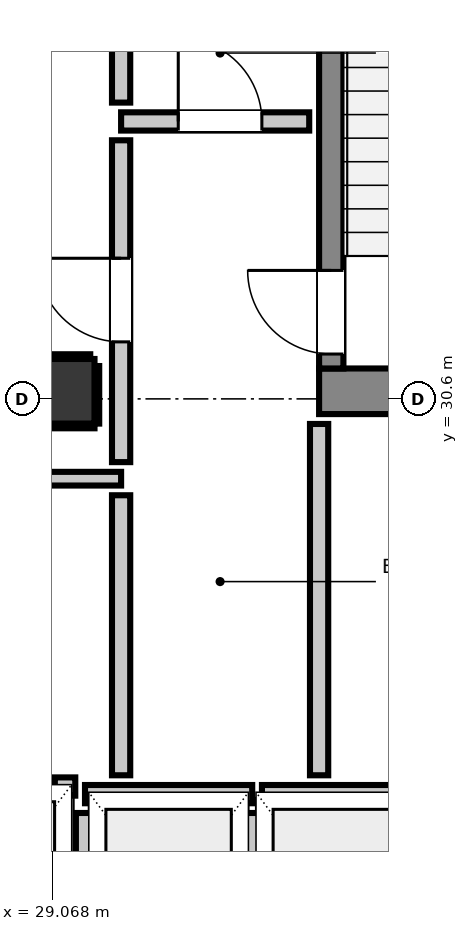
"""IFC4 building model, lengths in metres.
Left out: names, types, materials, properties, quantities, classifications, styles, units other than length and angle.
Written with IfcOpenShell. Run it as: python <this file> out.ifc"""

import sys

from ifc_helpers import new_model, si_unit, direction, frame, frame_2d, origin, origin_2d, place, context, subcontext, project, spatial, rectangle, extrude, element, fill, save


model = new_model("IFC4")
c1 = context("Model", 3, precision=1e-05, world=origin(), true_north=direction((0.0, 1.0)))
c2 = subcontext(c1, "Body", "Model", "MODEL_VIEW")
j1 = project(units=[si_unit("LENGTHUNIT", "METRE"), si_unit("PLANEANGLEUNIT", "RADIAN")], contexts=[c1])
p1 = place(None, origin())
s1 = spatial("IfcSite", under=j1, at=p1, CompositionType="ELEMENT")
p2 = place(p1, origin())
s2 = spatial("IfcBuilding", under=s1, at=p2, CompositionType="ELEMENT")
p3 = place(p2, frame((0.0, 0.0, 234.6)))
s3 = spatial("IfcBuildingStorey", under=s2, at=p3, CompositionType="ELEMENT", Elevation=234.6)
p4 = place(p3, frame((32.58, 30.7, 0.0), z_axis=(0.0, 0.0, 1.0), x_axis=(1.0, 0.0, 0.0)))
e1 = element("IfcWall", 1, at=p4, inside=s3, PredefinedType="SHEAR", context=c2, shape_type="SweptSolid", body=[
    extrude(rectangle(XDim=3.54, YDim=0.6, at=frame_2d((1.77, 0.0))), origin(), (0.0, 0.0, 1.0), 3.32),
])
p5 = place(p3, frame((32.74, 31.0, 0.0), z_axis=(0.0, 0.0, 1.0), x_axis=(0.0, 1.0, 0.0)))
e2 = element("IfcWall", 2, at=p5, inside=s3, PredefinedType="SHEAR", context=c2, shape_type="SweptSolid", body=[
    extrude(rectangle(XDim=7.8, YDim=0.32, at=frame_2d((3.9, 0.0))), origin(), (0.0, 0.0, 1.0), 3.32),
])
p6 = place(p5, frame((0.19, 0.0, 0.0)))
e3 = element("IfcOpeningElement", 3, at=p6, cuts=e2, PredefinedType="OPENING", context=c2, shape_type="SweptSolid", body=[
    extrude(rectangle(XDim=1.1, YDim=2.15, at=frame_2d((0.55, 1.075))), frame((0.0, 0.17, 0.0), z_axis=(0.0, -1.0, 0.0), x_axis=(1.0, 0.0, 0.0)), (0.0, 0.0, 1.0), 0.34),
])
p7 = place(p3, frame((29.2, 30.7, 0.0), z_axis=(0.0, 0.0, 1.0), x_axis=(1.0, 0.0, 0.0)))
e4 = element("IfcColumn", 4, at=p7, inside=s3, PredefinedType="COLUMN", context=c2, shape_type="SweptSolid", body=[
    extrude(rectangle(XDim=0.85, YDim=0.85, at=origin_2d()), origin(), (0.0, 0.0, 1.0), 3.32),
])
p8 = place(p3, frame((29.5, 25.4, 0.0), z_axis=(0.0, 0.0, 1.0), x_axis=(1.0, 0.0, 0.0)))
e5 = element("IfcWall", 5, at=p8, inside=s3, PredefinedType="PARTITIONING", context=c2, shape_type="SweptSolid", body=[
    extrude(rectangle(XDim=2.2, YDim=0.24, at=frame_2d((1.1, 0.0))), origin(), (0.0, 0.0, 1.0), 3.1),
])
p9 = place(p3, frame((29.5, 22.848, 0.0), z_axis=(0.0, 0.0, 1.0), x_axis=(0.0, 1.0, 0.0)))
e6 = element("IfcWall", 6, at=p9, inside=s3, PredefinedType="PARTITIONING", context=c2, shape_type="SweptSolid", body=[
    extrude(rectangle(XDim=2.304, YDim=0.24, at=frame_2d((1.152, 0.0))), origin(), (0.0, 0.0, 1.0), 2.335),
])
p10 = place(p3, frame((31.7, 22.848, 0.0), z_axis=(0.0, 0.0, 1.0), x_axis=(0.0, 1.0, 0.0)))
e7 = element("IfcWall", 7, at=p10, inside=s3, PredefinedType="PARTITIONING", context=c2, shape_type="SweptSolid", body=[
    extrude(rectangle(XDim=2.304, YDim=0.24, at=frame_2d((1.152, 0.0))), origin(), (0.0, 0.0, 1.0), 3.1),
])
p11 = place(p3, frame((31.828, 25.4, 0.0), z_axis=(0.0, 0.0, 1.0), x_axis=(1.0, 0.0, 0.0)))
e8 = element("IfcWall", 8, at=p11, inside=s3, PredefinedType="PARTITIONING", context=c2, shape_type="SweptSolid", body=[
    extrude(rectangle(XDim=2.072, YDim=0.24, at=frame_2d((1.036, 0.0))), origin(), (0.0, 0.0, 1.0), 3.1),
])
p12 = place(p3, frame((29.103, 25.5, 0.0), z_axis=(0.0, 0.0, 1.0), x_axis=(1.0, 0.0, 0.0)))
e9 = element("IfcWall", 9, at=p12, inside=s3, PredefinedType="PARTITIONING", context=c2, shape_type="SweptSolid", body=[
    extrude(rectangle(XDim=0.269, YDim=0.24, at=frame_2d((0.135, 0.0))), origin(), (0.0, 0.0, 1.0), 3.1),
])
p13 = place(p3, frame((29.975, 34.25, 0.0), z_axis=(0.0, 0.0, 1.0), x_axis=(1.0, 0.0, 0.0)))
e10 = element("IfcWall", 10, at=p13, inside=s3, PredefinedType="PARTITIONING", context=c2, shape_type="SweptSolid", body=[
    extrude(rectangle(XDim=2.475, YDim=0.24, at=frame_2d((1.237, 0.0))), origin(), (0.0, 0.0, 1.0), 3.1),
])
p14 = place(p13, frame((0.752, 0.0, 0.0)))
e11 = element("IfcOpeningElement", 11, at=p14, cuts=e10, PredefinedType="OPENING", context=c2, shape_type="SweptSolid", body=[
    extrude(rectangle(XDim=1.1, YDim=2.15, at=frame_2d((0.55, 1.075))), frame((0.0, 0.13, 0.0), z_axis=(0.0, -1.0, 0.0), x_axis=(1.0, 0.0, 0.0)), (0.0, 0.0, 1.0), 0.26),
])
p15 = place(p3, frame((28.593, 29.55, 0.0), z_axis=(0.0, 0.0, 1.0), x_axis=(1.0, 0.0, 0.0)))
e12 = element("IfcWall", 12, at=p15, inside=s3, PredefinedType="PARTITIONING", context=c2, shape_type="SweptSolid", body=[
    extrude(rectangle(XDim=1.382, YDim=0.18, at=frame_2d((0.691, 0.0))), origin(), (0.0, 0.0, 1.0), 3.1),
])
p16 = place(p3, frame((29.975, 25.648, 0.0), z_axis=(0.0, 0.0, 1.0), x_axis=(0.0, 1.0, 0.0)))
e13 = element("IfcWall", 13, at=p16, inside=s3, PredefinedType="PARTITIONING", context=c2, shape_type="SweptSolid", body=[
    extrude(rectangle(XDim=3.684, YDim=0.24, at=frame_2d((1.842, 0.0))), origin(), (0.0, 0.0, 1.0), 3.1),
])
p17 = place(p3, frame((29.975, 29.768, 0.0), z_axis=(0.0, 0.0, 1.0), x_axis=(0.0, 1.0, 0.0)))
e14 = element("IfcWall", 14, at=p17, inside=s3, PredefinedType="PARTITIONING", context=c2, shape_type="SweptSolid", body=[
    extrude(rectangle(XDim=4.234, YDim=0.24, at=frame_2d((2.117, 0.0))), origin(), (0.0, 0.0, 1.0), 3.1),
])
p18 = place(p17, frame((1.582, 0.0, 0.0)))
e15 = element("IfcOpeningElement", 15, at=p18, cuts=e14, PredefinedType="OPENING", context=c2, shape_type="SweptSolid", body=[
    extrude(rectangle(XDim=1.1, YDim=2.15, at=frame_2d((0.55, 1.075))), frame((0.0, 0.13, 0.0), z_axis=(0.0, -1.0, 0.0), x_axis=(1.0, 0.0, 0.0)), (0.0, 0.0, 1.0), 0.26),
])
p19 = place(p3, frame((29.975, 34.498, 0.0), z_axis=(0.0, 0.0, 1.0), x_axis=(0.0, 1.0, 0.0)))
e16 = element("IfcWall", 16, at=p19, inside=s3, PredefinedType="PARTITIONING", context=c2, shape_type="SweptSolid", body=[
    extrude(rectangle(XDim=0.924, YDim=0.24, at=frame_2d((0.462, 0.0))), origin(), (0.0, 0.0, 1.0), 3.1),
])
p20 = place(p3, frame((32.58, 25.648, 0.0), z_axis=(0.0, 0.0, 1.0), x_axis=(0.0, 1.0, 0.0)))
e17 = element("IfcWall", 17, at=p20, inside=s3, PredefinedType="PARTITIONING", context=c2, shape_type="SweptSolid", body=[
    extrude(rectangle(XDim=4.622, YDim=0.24, at=frame_2d((2.311, 0.0))), origin(), (0.0, 0.0, 1.0), 3.1),
])
p21 = place(p3, frame((28.775, 30.243, 0.0), z_axis=(0.0, 0.0, 1.0), x_axis=(1.0, 0.0, 0.0)))
e18 = element("IfcWall", 18, at=p21, inside=s3, PredefinedType="PARTITIONING", context=c2, shape_type="SweptSolid", body=[
    extrude(rectangle(XDim=0.85, YDim=0.06, at=frame_2d((0.425, 0.0))), origin(), (0.0, 0.0, 1.0), 1.45),
])
p22 = place(p3, frame((28.775, 31.157, 0.0), z_axis=(0.0, 0.0, 1.0), x_axis=(1.0, 0.0, 0.0)))
e19 = element("IfcWall", 19, at=p22, inside=s3, PredefinedType="PARTITIONING", context=c2, shape_type="SweptSolid", body=[
    extrude(rectangle(XDim=0.794, YDim=0.06, at=frame_2d((0.397, 0.0))), origin(), (0.0, 0.0, 1.0), 1.45),
])
p23 = place(p3, frame((29.657, 30.275, 0.0), z_axis=(0.0, 0.0, 1.0), x_axis=(0.0, 1.0, 0.0)))
e20 = element("IfcWall", 20, at=p23, inside=s3, PredefinedType="PARTITIONING", context=c2, shape_type="SweptSolid", body=[
    extrude(rectangle(XDim=0.757, YDim=0.06, at=frame_2d((0.378, 0.0))), origin(), (0.0, 0.0, 1.0), 1.45),
])
p24 = place(p6, origin())
e21 = element("IfcDoor", 21, at=p24, inside=s3, OperationType="SINGLE_SWING_RIGHT", PredefinedType="DOOR", context=c2, shape_type="SweptSolid", body=[
    extrude(rectangle(XDim=1.1, YDim=2.15, at=frame_2d((0.55, 1.075))), frame((0.0, 0.025, 0.0), z_axis=(0.0, -1.0, 0.0), x_axis=(1.0, 0.0, 0.0)), (0.0, 0.0, 1.0), 0.05),
])
fill(e3, e21)
p25 = place(p18, origin())
e22 = element("IfcDoor", 22, at=p25, inside=s3, OperationType="SINGLE_SWING_RIGHT", PredefinedType="DOOR", context=c2, shape_type="SweptSolid", body=[
    extrude(rectangle(XDim=1.1, YDim=2.15, at=frame_2d((0.55, 1.075))), frame((0.0, 0.025, 0.0), z_axis=(0.0, -1.0, 0.0), x_axis=(1.0, 0.0, 0.0)), (0.0, 0.0, 1.0), 0.05),
])
fill(e15, e22)
p26 = place(p14, origin())
e23 = element("IfcDoor", 23, at=p26, inside=s3, OperationType="SINGLE_SWING_LEFT", PredefinedType="DOOR", context=c2, shape_type="SweptSolid", body=[
    extrude(rectangle(XDim=1.1, YDim=2.15, at=frame_2d((0.55, 1.075))), frame((0.0, 0.025, 0.0), z_axis=(0.0, -1.0, 0.0), x_axis=(1.0, 0.0, 0.0)), (0.0, 0.0, 1.0), 0.05),
])
fill(e11, e23)
save(model, sys.argv[1])
